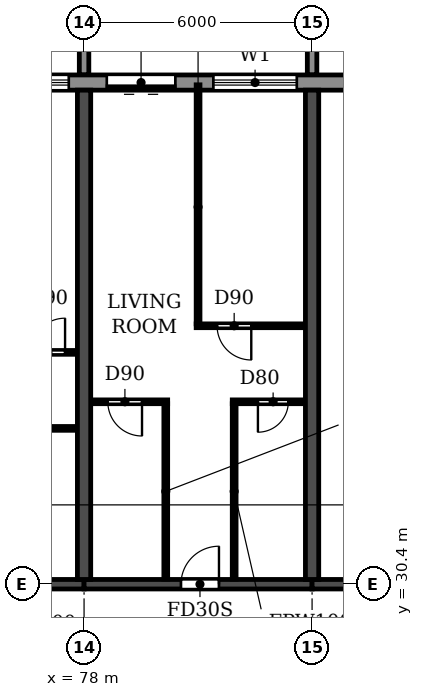
"""IFC4 building model, lengths in metres.
Left out: names, types, materials, properties, quantities, classifications, styles, units other than length and angle.
Written with IfcOpenShell. Run it as: python <this file> out.ifc"""

import sys

from ifc_helpers import new_model, si_unit, direction, frame, frame_2d, origin, place, context, subcontext, project, spatial, polyline, rectangle, outline, extrude, source, transform, mapped, element, fill, save


model = new_model("IFC4")
c1 = context("Model", 3, precision=1e-05, world=origin(), true_north=direction((0.0, 1.0)))
c2 = subcontext(c1, "Body", "Model", "MODEL_VIEW")
j1 = project(units=[si_unit("LENGTHUNIT", "METRE"), si_unit("PLANEANGLEUNIT", "RADIAN")], contexts=[c1])
p1 = place(None, origin())
s1 = spatial("IfcSite", under=j1, at=p1, CompositionType="ELEMENT")
p2 = place(p1, origin())
s2 = spatial("IfcBuilding", under=s1, at=p2, CompositionType="ELEMENT")
p3 = place(p2, frame((0.0, 0.0, 109.2)))
s3 = spatial("IfcBuildingStorey", under=s2, at=p3, CompositionType="ELEMENT", Elevation=109.2)
for number, where, z_axis, x_axis in (
    (1, (78.0, 30.525, 0.0), (0.0, 0.0, 1.0), (0.0, 1.0, 0.0)),
    (2, (84.0, 30.525, 0.0), (0.0, 0.0, 1.0), (0.0, 1.0, 0.0)),
):
    element("IfcWall", number, at=place(p3, frame(where, z_axis=z_axis, x_axis=x_axis)), inside=s3, PredefinedType="SHEAR", context=c2, shape_type="SweptSolid", body=[
        extrude(rectangle(XDim=12.875, YDim=0.35, at=frame_2d((6.438, 0.0))), origin(), (0.0, 0.0, 1.0), 3.06),
    ])
p4 = place(p3, frame((72.0, 30.4, 0.0), z_axis=(0.0, 0.0, 1.0), x_axis=(1.0, 0.0, 0.0)))
e3 = element("IfcWall", 3, at=p4, inside=s3, PredefinedType="SHEAR", context=c2, shape_type="SweptSolid", body=[
    extrude(rectangle(XDim=6.0, YDim=0.25, at=frame_2d((3.0, 0.0))), origin(), (0.0, 0.0, 1.0), 2.46),
])
p5 = place(p3, frame((78.0, 30.4, 0.0), z_axis=(0.0, 0.0, 1.0), x_axis=(1.0, 0.0, 0.0)))
e4 = element("IfcWall", 4, at=p5, inside=s3, PredefinedType="SHEAR", context=c2, shape_type="SweptSolid", body=[
    extrude(rectangle(XDim=6.0, YDim=0.25, at=frame_2d((3.0, 0.0))), origin(), (0.0, 0.0, 1.0), 2.46),
])
p6 = place(p5, frame((2.55, 0.0, 0.0)))
e5 = element("IfcOpeningElement", 5, at=p6, cuts=e4, PredefinedType="OPENING", context=c2, shape_type="SweptSolid", body=[
    extrude(rectangle(XDim=1.0, YDim=2.1, at=frame_2d((0.5, 1.05))), frame((0.0, 0.135, 0.0), z_axis=(0.0, -1.0, 0.0), x_axis=(1.0, 0.0, 0.0)), (0.0, 0.0, 1.0), 0.27),
])
p7 = place(p3, frame((84.0, 30.4, 0.0), z_axis=(0.0, 0.0, 1.0), x_axis=(1.0, 0.0, 0.0)))
e6 = element("IfcWall", 6, at=p7, inside=s3, PredefinedType="SHEAR", context=c2, shape_type="SweptSolid", body=[
    extrude(rectangle(XDim=5.8, YDim=0.25, at=frame_2d((2.9, 0.0))), origin(), (0.0, 0.0, 1.0), 2.46),
])
p8 = place(p7, frame((2.5, 0.0, 0.0)))
e7 = element("IfcOpeningElement", 7, at=p8, cuts=e6, PredefinedType="OPENING", context=c2, shape_type="SweptSolid", body=[
    extrude(rectangle(XDim=1.0, YDim=2.1, at=frame_2d((0.5, 1.05))), frame((0.0, 0.135, 0.0), z_axis=(0.0, -1.0, 0.0), x_axis=(1.0, 0.0, 0.0)), (0.0, 0.0, 1.0), 0.27),
])
p9 = place(p3, frame((85.317, 43.6, 0.0), z_axis=(0.0, 0.0, 1.0), x_axis=(-1.0, 0.0, 0.0)))
e8 = element("IfcWall", 8, at=p9, inside=s3, PredefinedType="STANDARD", context=c2, shape_type="SweptSolid", body=[
    extrude(rectangle(XDim=68.634, YDim=0.4, at=frame_2d((34.317, 0.0))), origin(), (0.0, 0.0, 1.0), 3.06),
])
p10 = place(p9, frame((64.917, 0.0, 0.0)))
e9 = element("IfcOpeningElement", 9, at=p10, cuts=e8, PredefinedType="OPENING", context=c2, shape_type="SweptSolid", body=[
    extrude(rectangle(XDim=1.8, YDim=2.4, at=frame_2d((0.9, 1.2))), frame((0.0, 0.21, 0.0), z_axis=(0.0, -1.0, 0.0), x_axis=(1.0, 0.0, 0.0)), (0.0, 0.0, 1.0), 0.42),
])
p11 = place(p9, frame((61.717, 0.0, 0.9)))
e10 = element("IfcOpeningElement", 10, at=p11, cuts=e8, PredefinedType="OPENING", context=c2, shape_type="SweptSolid", body=[
    extrude(rectangle(XDim=2.2, YDim=1.5, at=frame_2d((1.1, 0.75))), frame((0.0, 0.21, 0.0), z_axis=(0.0, -1.0, 0.0), x_axis=(1.0, 0.0, 0.0)), (0.0, 0.0, 1.0), 0.42),
])
p12 = place(p9, frame((58.717, 0.0, 0.9)))
e11 = element("IfcOpeningElement", 11, at=p12, cuts=e8, PredefinedType="OPENING", context=c2, shape_type="SweptSolid", body=[
    extrude(rectangle(XDim=2.2, YDim=1.5, at=frame_2d((1.1, 0.75))), frame((0.0, 0.21, 0.0), z_axis=(0.0, -1.0, 0.0), x_axis=(1.0, 0.0, 0.0)), (0.0, 0.0, 1.0), 0.42),
])
p13 = place(p9, frame((55.917, 0.0, 0.0)))
e12 = element("IfcOpeningElement", 12, at=p13, cuts=e8, PredefinedType="OPENING", context=c2, shape_type="SweptSolid", body=[
    extrude(rectangle(XDim=1.8, YDim=2.4, at=frame_2d((0.9, 1.2))), frame((0.0, 0.21, 0.0), z_axis=(0.0, -1.0, 0.0), x_axis=(1.0, 0.0, 0.0)), (0.0, 0.0, 1.0), 0.42),
])
p14 = place(p9, frame((52.917, 0.0, 0.0)))
e13 = element("IfcOpeningElement", 13, at=p14, cuts=e8, PredefinedType="OPENING", context=c2, shape_type="SweptSolid", body=[
    extrude(rectangle(XDim=1.8, YDim=2.4, at=frame_2d((0.9, 1.2))), frame((0.0, 0.21, 0.0), z_axis=(0.0, -1.0, 0.0), x_axis=(1.0, 0.0, 0.0)), (0.0, 0.0, 1.0), 0.42),
])
p15 = place(p9, frame((49.717, 0.0, 0.9)))
e14 = element("IfcOpeningElement", 14, at=p15, cuts=e8, PredefinedType="OPENING", context=c2, shape_type="SweptSolid", body=[
    extrude(rectangle(XDim=2.2, YDim=1.5, at=frame_2d((1.1, 0.75))), frame((0.0, 0.21, 0.0), z_axis=(0.0, -1.0, 0.0), x_axis=(1.0, 0.0, 0.0)), (0.0, 0.0, 1.0), 0.42),
])
p16 = place(p9, frame((46.717, 0.0, 0.9)))
e15 = element("IfcOpeningElement", 15, at=p16, cuts=e8, PredefinedType="OPENING", context=c2, shape_type="SweptSolid", body=[
    extrude(rectangle(XDim=2.2, YDim=1.5, at=frame_2d((1.1, 0.75))), frame((0.0, 0.21, 0.0), z_axis=(0.0, -1.0, 0.0), x_axis=(1.0, 0.0, 0.0)), (0.0, 0.0, 1.0), 0.42),
])
p17 = place(p9, frame((43.917, 0.0, 0.0)))
e16 = element("IfcOpeningElement", 16, at=p17, cuts=e8, PredefinedType="OPENING", context=c2, shape_type="SweptSolid", body=[
    extrude(rectangle(XDim=1.8, YDim=2.4, at=frame_2d((0.9, 1.2))), frame((0.0, 0.21, 0.0), z_axis=(0.0, -1.0, 0.0), x_axis=(1.0, 0.0, 0.0)), (0.0, 0.0, 1.0), 0.42),
])
p18 = place(p9, frame((40.717, 0.0, 0.9)))
e17 = element("IfcOpeningElement", 17, at=p18, cuts=e8, PredefinedType="OPENING", context=c2, shape_type="SweptSolid", body=[
    extrude(rectangle(XDim=2.2, YDim=1.5, at=frame_2d((1.1, 0.75))), frame((0.0, 0.21, 0.0), z_axis=(0.0, -1.0, 0.0), x_axis=(1.0, 0.0, 0.0)), (0.0, 0.0, 1.0), 0.42),
])
p19 = place(p9, frame((37.717, 0.0, 0.9)))
e18 = element("IfcOpeningElement", 18, at=p19, cuts=e8, PredefinedType="OPENING", context=c2, shape_type="SweptSolid", body=[
    extrude(rectangle(XDim=2.2, YDim=1.5, at=frame_2d((1.1, 0.75))), frame((0.0, 0.21, 0.0), z_axis=(0.0, -1.0, 0.0), x_axis=(1.0, 0.0, 0.0)), (0.0, 0.0, 1.0), 0.42),
])
p20 = place(p9, frame((34.917, 0.0, 0.0)))
e19 = element("IfcOpeningElement", 19, at=p20, cuts=e8, PredefinedType="OPENING", context=c2, shape_type="SweptSolid", body=[
    extrude(rectangle(XDim=1.8, YDim=2.4, at=frame_2d((0.9, 1.2))), frame((0.0, 0.21, 0.0), z_axis=(0.0, -1.0, 0.0), x_axis=(1.0, 0.0, 0.0)), (0.0, 0.0, 1.0), 0.42),
])
p21 = place(p9, frame((31.717, 0.0, 0.9)))
e20 = element("IfcOpeningElement", 20, at=p21, cuts=e8, PredefinedType="OPENING", context=c2, shape_type="SweptSolid", body=[
    extrude(rectangle(XDim=2.2, YDim=1.5, at=frame_2d((1.1, 0.75))), frame((0.0, 0.21, 0.0), z_axis=(0.0, -1.0, 0.0), x_axis=(1.0, 0.0, 0.0)), (0.0, 0.0, 1.0), 0.42),
])
p22 = place(p9, frame((28.917, 0.0, 0.0)))
e21 = element("IfcOpeningElement", 21, at=p22, cuts=e8, PredefinedType="OPENING", context=c2, shape_type="SweptSolid", body=[
    extrude(rectangle(XDim=1.8, YDim=2.4, at=frame_2d((0.9, 1.2))), frame((0.0, 0.21, 0.0), z_axis=(0.0, -1.0, 0.0), x_axis=(1.0, 0.0, 0.0)), (0.0, 0.0, 1.0), 0.42),
])
p23 = place(p9, frame((25.717, 0.0, 0.9)))
e22 = element("IfcOpeningElement", 22, at=p23, cuts=e8, PredefinedType="OPENING", context=c2, shape_type="SweptSolid", body=[
    extrude(rectangle(XDim=2.2, YDim=1.5, at=frame_2d((1.1, 0.75))), frame((0.0, 0.21, 0.0), z_axis=(0.0, -1.0, 0.0), x_axis=(1.0, 0.0, 0.0)), (0.0, 0.0, 1.0), 0.42),
])
p24 = place(p9, frame((22.717, 0.0, 0.9)))
e23 = element("IfcOpeningElement", 23, at=p24, cuts=e8, PredefinedType="OPENING", context=c2, shape_type="SweptSolid", body=[
    extrude(rectangle(XDim=2.2, YDim=1.5, at=frame_2d((1.1, 0.75))), frame((0.0, 0.21, 0.0), z_axis=(0.0, -1.0, 0.0), x_axis=(1.0, 0.0, 0.0)), (0.0, 0.0, 1.0), 0.42),
])
p25 = place(p9, frame((19.917, 0.0, 0.0)))
e24 = element("IfcOpeningElement", 24, at=p25, cuts=e8, PredefinedType="OPENING", context=c2, shape_type="SweptSolid", body=[
    extrude(rectangle(XDim=1.8, YDim=2.4, at=frame_2d((0.9, 1.2))), frame((0.0, 0.21, 0.0), z_axis=(0.0, -1.0, 0.0), x_axis=(1.0, 0.0, 0.0)), (0.0, 0.0, 1.0), 0.42),
])
p26 = place(p9, frame((16.717, 0.0, 0.9)))
e25 = element("IfcOpeningElement", 25, at=p26, cuts=e8, PredefinedType="OPENING", context=c2, shape_type="SweptSolid", body=[
    extrude(rectangle(XDim=2.2, YDim=1.5, at=frame_2d((1.1, 0.75))), frame((0.0, 0.21, 0.0), z_axis=(0.0, -1.0, 0.0), x_axis=(1.0, 0.0, 0.0)), (0.0, 0.0, 1.0), 0.42),
])
p27 = place(p9, frame((13.917, 0.0, 0.0)))
e26 = element("IfcOpeningElement", 26, at=p27, cuts=e8, PredefinedType="OPENING", context=c2, shape_type="SweptSolid", body=[
    extrude(rectangle(XDim=1.8, YDim=2.4, at=frame_2d((0.9, 1.2))), frame((0.0, 0.21, 0.0), z_axis=(0.0, -1.0, 0.0), x_axis=(1.0, 0.0, 0.0)), (0.0, 0.0, 1.0), 0.42),
])
p28 = place(p9, frame((10.717, 0.0, 0.9)))
e27 = element("IfcOpeningElement", 27, at=p28, cuts=e8, PredefinedType="OPENING", context=c2, shape_type="SweptSolid", body=[
    extrude(rectangle(XDim=2.2, YDim=1.5, at=frame_2d((1.1, 0.75))), frame((0.0, 0.21, 0.0), z_axis=(0.0, -1.0, 0.0), x_axis=(1.0, 0.0, 0.0)), (0.0, 0.0, 1.0), 0.42),
])
p29 = place(p9, frame((7.717, 0.0, 0.9)))
e28 = element("IfcOpeningElement", 28, at=p29, cuts=e8, PredefinedType="OPENING", context=c2, shape_type="SweptSolid", body=[
    extrude(rectangle(XDim=2.2, YDim=1.5, at=frame_2d((1.1, 0.75))), frame((0.0, 0.21, 0.0), z_axis=(0.0, -1.0, 0.0), x_axis=(1.0, 0.0, 0.0)), (0.0, 0.0, 1.0), 0.42),
])
p30 = place(p9, frame((4.917, 0.0, 0.0)))
e29 = element("IfcOpeningElement", 29, at=p30, cuts=e8, PredefinedType="OPENING", context=c2, shape_type="SweptSolid", body=[
    extrude(rectangle(XDim=1.8, YDim=2.4, at=frame_2d((0.9, 1.2))), frame((0.0, 0.21, 0.0), z_axis=(0.0, -1.0, 0.0), x_axis=(1.0, 0.0, 0.0)), (0.0, 0.0, 1.0), 0.42),
])
p31 = place(p9, frame((1.717, 0.0, 0.9)))
e30 = element("IfcOpeningElement", 30, at=p31, cuts=e8, PredefinedType="OPENING", context=c2, shape_type="SweptSolid", body=[
    extrude(rectangle(XDim=2.2, YDim=1.5, at=frame_2d((1.1, 0.75))), frame((0.0, 0.21, 0.0), z_axis=(0.0, -1.0, 0.0), x_axis=(1.0, 0.0, 0.0)), (0.0, 0.0, 1.0), 0.42),
])
m1 = source(origin(), c2, "Body", "SweptSolid", [
    extrude(outline(polyline([(0.0, 0.0), (0.25, 0.0), (0.25, 3.1), (0.0, 3.1), (0.0, 0.0)])), origin(), (0.0, 0.0, 1.0), 3.1),
])
for number, where in (
    (31, (77.875, 43.8, 0.0)),
    (32, (83.875, 43.8, 0.0)),
):
    element("IfcWall", number, at=place(p3, frame(where)), inside=s3, PredefinedType="STANDARD", context=c2, shape_type="MappedRepresentation", body=[
        mapped(m1, transform((0.0, 0.0, 0.0))),
    ])
p32 = place(p3, frame((72.185, 34.5, 0.0), z_axis=(0.0, 0.0, 1.0), x_axis=(1.0, 0.0, 0.0)))
e33 = element("IfcWall", 33, at=p32, inside=s3, PredefinedType="PARTITIONING", context=c2, shape_type="SweptSolid", body=[
    extrude(rectangle(XDim=5.63, YDim=0.1, at=frame_2d((2.815, 0.0))), origin(), (0.0, 0.0, 1.0), 3.06),
])
p33 = place(p32, frame((1.065, 0.0, 0.0)))
e34 = element("IfcOpeningElement", 34, at=p33, cuts=e33, PredefinedType="OPENING", context=c2, shape_type="SweptSolid", body=[
    extrude(rectangle(XDim=0.8, YDim=2.1, at=frame_2d((0.4, 1.05))), frame((0.0, 0.06, 0.0), z_axis=(0.0, -1.0, 0.0), x_axis=(1.0, 0.0, 0.0)), (0.0, 0.0, 1.0), 0.12),
])
p34 = place(p32, frame((4.065, 0.0, 0.0)))
e35 = element("IfcOpeningElement", 35, at=p34, cuts=e33, PredefinedType="OPENING", context=c2, shape_type="SweptSolid", body=[
    extrude(rectangle(XDim=0.8, YDim=2.1, at=frame_2d((0.4, 1.05))), frame((0.0, 0.06, 0.0), z_axis=(0.0, -1.0, 0.0), x_axis=(1.0, 0.0, 0.0)), (0.0, 0.0, 1.0), 0.12),
])
p35 = place(p3, frame((78.185, 35.2, 0.0), z_axis=(0.0, 0.0, 1.0), x_axis=(1.0, 0.0, 0.0)))
e36 = element("IfcWall", 36, at=p35, inside=s3, PredefinedType="PARTITIONING", context=c2, shape_type="SweptSolid", body=[
    extrude(rectangle(XDim=2.015, YDim=0.1, at=frame_2d((1.007, 0.0))), origin(), (0.0, 0.0, 1.0), 3.06),
])
p36 = place(p35, frame((0.44, 0.0, 0.0)))
e37 = element("IfcOpeningElement", 37, at=p36, cuts=e36, PredefinedType="OPENING", context=c2, shape_type="SweptSolid", body=[
    extrude(rectangle(XDim=0.9, YDim=2.1, at=frame_2d((0.45, 1.05))), frame((0.0, 0.06, 0.0), z_axis=(0.0, -1.0, 0.0), x_axis=(1.0, 0.0, 0.0)), (0.0, 0.0, 1.0), 0.12),
])
p37 = place(p3, frame((81.9, 35.2, 0.0), z_axis=(0.0, 0.0, 1.0), x_axis=(1.0, 0.0, 0.0)))
e38 = element("IfcWall", 38, at=p37, inside=s3, PredefinedType="PARTITIONING", context=c2, shape_type="SweptSolid", body=[
    extrude(rectangle(XDim=1.915, YDim=0.1, at=frame_2d((0.958, 0.0))), origin(), (0.0, 0.0, 1.0), 3.06),
])
p38 = place(p37, frame((0.675, 0.0, 0.0)))
e39 = element("IfcOpeningElement", 39, at=p38, cuts=e38, PredefinedType="OPENING", context=c2, shape_type="SweptSolid", body=[
    extrude(rectangle(XDim=0.8, YDim=2.1, at=frame_2d((0.4, 1.05))), frame((0.0, 0.06, 0.0), z_axis=(0.0, -1.0, 0.0), x_axis=(1.0, 0.0, 0.0)), (0.0, 0.0, 1.0), 0.12),
])
p39 = place(p3, frame((72.185, 36.5, 0.0), z_axis=(0.0, 0.0, 1.0), x_axis=(1.0, 0.0, 0.0)))
e40 = element("IfcWall", 40, at=p39, inside=s3, PredefinedType="PARTITIONING", context=c2, shape_type="SweptSolid", body=[
    extrude(rectangle(XDim=5.63, YDim=0.1, at=frame_2d((2.815, 0.0))), origin(), (0.0, 0.0, 1.0), 3.06),
])
p40 = place(p39, frame((0.315, 0.0, 0.0)))
e41 = element("IfcOpeningElement", 41, at=p40, cuts=e40, PredefinedType="OPENING", context=c2, shape_type="SweptSolid", body=[
    extrude(rectangle(XDim=0.9, YDim=2.1, at=frame_2d((0.45, 1.05))), frame((0.0, 0.06, 0.0), z_axis=(0.0, -1.0, 0.0), x_axis=(1.0, 0.0, 0.0)), (0.0, 0.0, 1.0), 0.12),
])
p41 = place(p39, frame((4.415, 0.0, 0.0)))
e42 = element("IfcOpeningElement", 42, at=p41, cuts=e40, PredefinedType="OPENING", context=c2, shape_type="SweptSolid", body=[
    extrude(rectangle(XDim=0.9, YDim=2.1, at=frame_2d((0.45, 1.05))), frame((0.0, 0.06, 0.0), z_axis=(0.0, -1.0, 0.0), x_axis=(1.0, 0.0, 0.0)), (0.0, 0.0, 1.0), 0.12),
])
p42 = place(p3, frame((80.95, 37.2, 0.0), z_axis=(0.0, 0.0, 1.0), x_axis=(1.0, 0.0, 0.0)))
e43 = element("IfcWall", 43, at=p42, inside=s3, PredefinedType="PARTITIONING", context=c2, shape_type="SweptSolid", body=[
    extrude(rectangle(XDim=2.865, YDim=0.1, at=frame_2d((1.433, 0.0))), origin(), (0.0, 0.0, 1.0), 3.06),
])
p43 = place(p42, frame((0.55, 0.0, 0.0)))
e44 = element("IfcOpeningElement", 44, at=p43, cuts=e43, PredefinedType="OPENING", context=c2, shape_type="SweptSolid", body=[
    extrude(rectangle(XDim=0.9, YDim=2.1, at=frame_2d((0.45, 1.05))), frame((0.0, 0.06, 0.0), z_axis=(0.0, -1.0, 0.0), x_axis=(1.0, 0.0, 0.0)), (0.0, 0.0, 1.0), 0.12),
])
p44 = place(p3, frame((80.15, 30.535, 0.0), z_axis=(0.0, 0.0, 1.0), x_axis=(0.0, 1.0, 0.0)))
e45 = element("IfcWall", 45, at=p44, inside=s3, PredefinedType="PARTITIONING", context=c2, shape_type="SweptSolid", body=[
    extrude(rectangle(XDim=4.615, YDim=0.1, at=frame_2d((2.308, 0.0))), origin(), (0.0, 0.0, 1.0), 3.06),
])
p45 = place(p3, frame((81.0, 37.25, 0.0), z_axis=(0.0, 0.0, 1.0), x_axis=(0.0, 1.0, 0.0)))
e46 = element("IfcWall", 46, at=p45, inside=s3, PredefinedType="PARTITIONING", context=c2, shape_type="SweptSolid", body=[
    extrude(rectangle(XDim=6.29, YDim=0.1, at=frame_2d((3.145, 0.0))), origin(), (0.0, 0.0, 1.0), 3.06),
])
p46 = place(p3, frame((81.95, 30.535, 0.0), z_axis=(0.0, 0.0, 1.0), x_axis=(0.0, 1.0, 0.0)))
e47 = element("IfcWall", 47, at=p46, inside=s3, PredefinedType="PARTITIONING", context=c2, shape_type="SweptSolid", body=[
    extrude(rectangle(XDim=4.615, YDim=0.1, at=frame_2d((2.308, 0.0))), origin(), (0.0, 0.0, 1.0), 3.06),
])
p47 = place(p29, origin())
e48 = element("IfcWindow", 48, at=p47, inside=s3, PartitioningType="DOUBLE_PANEL_HORIZONTAL", PredefinedType="WINDOW", context=c2, shape_type="SweptSolid", body=[
    extrude(rectangle(XDim=2.2, YDim=1.5, at=frame_2d((1.1, 0.75))), frame((0.0, 0.03, 0.0), z_axis=(0.0, -1.0, 0.0), x_axis=(1.0, 0.0, 0.0)), (0.0, 0.0, 1.0), 0.06),
])
fill(e28, e48)
p48 = place(p30, origin())
e49 = element("IfcDoor", 49, at=p48, inside=s3, OperationType="DOUBLE_DOOR_SLIDING", PredefinedType="DOOR", context=c2, shape_type="SweptSolid", body=[
    extrude(rectangle(XDim=1.8, YDim=2.4, at=frame_2d((0.9, 1.2))), frame((0.0, 0.025, 0.0), z_axis=(0.0, -1.0, 0.0), x_axis=(1.0, 0.0, 0.0)), (0.0, 0.0, 1.0), 0.05),
])
fill(e29, e49)
p49 = place(p31, origin())
e50 = element("IfcWindow", 50, at=p49, inside=s3, PartitioningType="DOUBLE_PANEL_HORIZONTAL", PredefinedType="WINDOW", context=c2, shape_type="SweptSolid", body=[
    extrude(rectangle(XDim=2.2, YDim=1.5, at=frame_2d((1.1, 0.75))), frame((0.0, 0.03, 0.0), z_axis=(0.0, -1.0, 0.0), x_axis=(1.0, 0.0, 0.0)), (0.0, 0.0, 1.0), 0.06),
])
fill(e30, e50)
p50 = place(p41, origin())
e51 = element("IfcDoor", 51, at=p50, inside=s3, OperationType="SINGLE_SWING_RIGHT", PredefinedType="DOOR", context=c2, shape_type="SweptSolid", body=[
    extrude(rectangle(XDim=0.9, YDim=2.1, at=frame_2d((0.45, 1.05))), frame((0.0, 0.025, 0.0), z_axis=(0.0, -1.0, 0.0), x_axis=(1.0, 0.0, 0.0)), (0.0, 0.0, 1.0), 0.05),
])
fill(e42, e51)
p51 = place(p36, frame((0.9, 0.0, 0.0), z_axis=(0.0, 0.0, 1.0), x_axis=(-1.0, 0.0, 0.0)))
e52 = element("IfcDoor", 52, at=p51, inside=s3, OperationType="SINGLE_SWING_LEFT", PredefinedType="DOOR", context=c2, shape_type="SweptSolid", body=[
    extrude(rectangle(XDim=0.9, YDim=2.1, at=frame_2d((0.45, 1.05))), frame((0.0, 0.025, 0.0), z_axis=(0.0, -1.0, 0.0), x_axis=(1.0, 0.0, 0.0)), (0.0, 0.0, 1.0), 0.05),
])
fill(e37, e52)
p52 = place(p6, origin())
e53 = element("IfcDoor", 53, at=p52, inside=s3, OperationType="SINGLE_SWING_RIGHT", PredefinedType="DOOR", context=c2, shape_type="SweptSolid", body=[
    extrude(rectangle(XDim=1.0, YDim=2.1, at=frame_2d((0.5, 1.05))), frame((0.0, 0.025, 0.0), z_axis=(0.0, -1.0, 0.0), x_axis=(1.0, 0.0, 0.0)), (0.0, 0.0, 1.0), 0.05),
])
fill(e5, e53)
p53 = place(p43, frame((0.9, 0.0, 0.0), z_axis=(0.0, 0.0, 1.0), x_axis=(-1.0, 0.0, 0.0)))
e54 = element("IfcDoor", 54, at=p53, inside=s3, OperationType="SINGLE_SWING_LEFT", PredefinedType="DOOR", context=c2, shape_type="SweptSolid", body=[
    extrude(rectangle(XDim=0.9, YDim=2.1, at=frame_2d((0.45, 1.05))), frame((0.0, 0.025, 0.0), z_axis=(0.0, -1.0, 0.0), x_axis=(1.0, 0.0, 0.0)), (0.0, 0.0, 1.0), 0.05),
])
fill(e44, e54)
p54 = place(p38, frame((0.8, 0.0, 0.0), z_axis=(0.0, 0.0, 1.0), x_axis=(-1.0, 0.0, 0.0)))
e55 = element("IfcDoor", 55, at=p54, inside=s3, OperationType="SINGLE_SWING_RIGHT", PredefinedType="DOOR", context=c2, shape_type="SweptSolid", body=[
    extrude(rectangle(XDim=0.8, YDim=2.1, at=frame_2d((0.4, 1.05))), frame((0.0, 0.025, 0.0), z_axis=(0.0, -1.0, 0.0), x_axis=(1.0, 0.0, 0.0)), (0.0, 0.0, 1.0), 0.05),
])
fill(e39, e55)
save(model, sys.argv[1])
